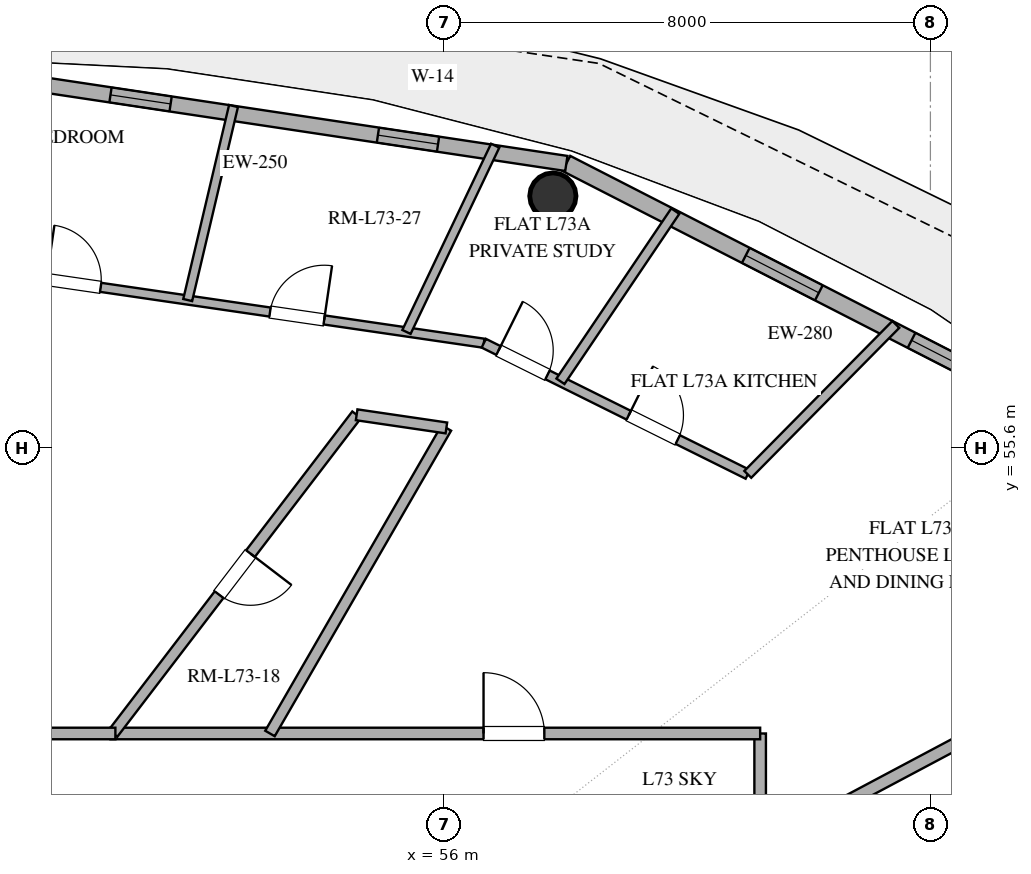
"""IFC4 building model, lengths in metres.
Left out: names, types, materials, properties, quantities, classifications, styles, units other than length and angle.
Written with IfcOpenShell. Run it as: python <this file> out.ifc"""

import sys

from ifc_helpers import new_model, si_unit, direction, frame, frame_2d, origin, origin_2d, place, context, subcontext, project, spatial, rectangle, hollow_circle, extrude, element, fill, save


model = new_model("IFC4")
c1 = context("Model", 3, precision=1e-05, world=origin(), true_north=direction((0.0, 1.0)))
c2 = subcontext(c1, "Body", "Model", "MODEL_VIEW")
j1 = project(units=[si_unit("LENGTHUNIT", "METRE"), si_unit("PLANEANGLEUNIT", "RADIAN")], contexts=[c1])
p1 = place(None, origin())
s1 = spatial("IfcSite", under=j1, at=p1, CompositionType="ELEMENT")
p2 = place(p1, origin())
s2 = spatial("IfcBuilding", under=s1, at=p2, CompositionType="ELEMENT")
p3 = place(p2, frame((0.0, 0.0, 283.8)))
s3 = spatial("IfcBuildingStorey", under=s2, at=p3, CompositionType="ELEMENT", Elevation=283.8)
p4 = place(p3, frame((57.791, 59.739, 0.0), z_axis=(0.0, 0.0, 1.0), x_axis=(1.0, 0.0, 0.0)))
e1 = element("IfcColumn", 1, at=p4, inside=s3, PredefinedType="COLUMN", context=c2, shape_type="SweptSolid", body=[
    extrude(hollow_circle(Radius=0.381, WallThickness=0.025, at=origin_2d()), origin(), (0.0, 0.0, 1.0), 3.37),
])
p5 = place(p3, frame((66.383, 55.987, 0.0), z_axis=(0.0, 0.0, 1.0), x_axis=(-0.890007394051, 0.455946091699, 0.0)))
e2 = element("IfcWall", 2, at=p5, inside=s3, PredefinedType="SOLIDWALL", context=c2, shape_type="SweptSolid", body=[
    extrude(rectangle(XDim=9.404, YDim=0.28, at=frame_2d((4.702, 0.0))), origin(), (0.0, 0.0, 1.0), 3.37),
])
p6 = place(p5, frame((1.675, 0.0, 0.85)))
e3 = element("IfcOpeningElement", 3, at=p6, cuts=e2, PredefinedType="OPENING", context=c2, shape_type="SweptSolid", body=[
    extrude(rectangle(XDim=1.35, YDim=1.8, at=frame_2d((0.675, 0.9))), frame((0.0, 0.15, 0.0), z_axis=(0.0, -1.0, 0.0), x_axis=(1.0, 0.0, 0.0)), (0.0, 0.0, 1.0), 0.3),
])
p7 = place(p5, frame((4.738, 0.0, 0.85)))
e4 = element("IfcOpeningElement", 4, at=p7, cuts=e2, PredefinedType="OPENING", context=c2, shape_type="SweptSolid", body=[
    extrude(rectangle(XDim=1.35, YDim=1.8, at=frame_2d((0.675, 0.9))), frame((0.0, 0.15, 0.0), z_axis=(0.0, -1.0, 0.0), x_axis=(1.0, 0.0, 0.0)), (0.0, 0.0, 1.0), 0.3),
])
p8 = place(p3, frame((58.013, 60.274, 0.0), z_axis=(0.0, 0.0, 1.0), x_axis=(-0.988882522213, 0.148698881169, 0.0)))
e5 = element("IfcWall", 5, at=p8, inside=s3, PredefinedType="SOLIDWALL", context=c2, shape_type="SweptSolid", body=[
    extrude(rectangle(XDim=10.125, YDim=0.25, at=frame_2d((5.062, 0.0))), origin(), (0.0, 0.0, 1.0), 3.37),
])
p9 = place(p8, frame((2.134, 0.0, 0.35)))
e6 = element("IfcOpeningElement", 6, at=p9, cuts=e5, PredefinedType="OPENING", context=c2, shape_type="SweptSolid", body=[
    extrude(rectangle(XDim=1.0, YDim=1.05, at=frame_2d((0.5, 0.525))), frame((0.0, 0.135, 0.0), z_axis=(0.0, -1.0, 0.0), x_axis=(1.0, 0.0, 0.0)), (0.0, 0.0, 1.0), 0.27),
])
p10 = place(p8, frame((6.582, 0.0, 1.42)))
e7 = element("IfcOpeningElement", 7, at=p10, cuts=e5, PredefinedType="OPENING", context=c2, shape_type="SweptSolid", body=[
    extrude(rectangle(XDim=1.0, YDim=1.05, at=frame_2d((0.5, 0.525))), frame((0.0, 0.135, 0.0), z_axis=(0.0, -1.0, 0.0), x_axis=(1.0, 0.0, 0.0)), (0.0, 0.0, 1.0), 0.27),
])
p11 = place(p3, frame((61.2, 50.9, 0.0), z_axis=(0.0, 0.0, 1.0), x_axis=(0.0, -1.0, 0.0)))
e8 = element("IfcWall", 8, at=p11, inside=s3, PredefinedType="PARTITIONING", context=c2, shape_type="SweptSolid", body=[
    extrude(rectangle(XDim=16.9, YDim=0.19, at=frame_2d((8.45, 0.0))), origin(), (0.0, 0.0, 1.0), 2.73),
])
p12 = place(p11, frame((8.873, 0.0, 0.0)))
e9 = element("IfcOpeningElement", 9, at=p12, cuts=e8, PredefinedType="OPENING", context=c2, shape_type="SweptSolid", body=[
    extrude(rectangle(XDim=1.0, YDim=2.2, at=frame_2d((0.5, 1.1))), frame((0.0, 0.105, 0.0), z_axis=(0.0, -1.0, 0.0), x_axis=(1.0, 0.0, 0.0)), (0.0, 0.0, 1.0), 0.21),
])
p13 = place(p3, frame((50.515, 50.9, 0.0), z_axis=(0.0, 0.0, 1.0), x_axis=(1.0, 0.0, 0.0)))
e10 = element("IfcWall", 10, at=p13, inside=s3, PredefinedType="PARTITIONING", context=c2, shape_type="SweptSolid", body=[
    extrude(rectangle(XDim=10.685, YDim=0.19, at=frame_2d((5.342, 0.0))), origin(), (0.0, 0.0, 1.0), 2.73),
])
p14 = place(p13, frame((6.135, 0.0, 0.0)))
e11 = element("IfcOpeningElement", 11, at=p14, cuts=e10, PredefinedType="OPENING", context=c2, shape_type="SweptSolid", body=[
    extrude(rectangle(XDim=1.0, YDim=2.2, at=frame_2d((0.5, 1.1))), frame((0.0, 0.105, 0.0), z_axis=(0.0, -1.0, 0.0), x_axis=(1.0, 0.0, 0.0)), (0.0, 0.0, 1.0), 0.21),
])
p15 = place(p3, frame((54.564, 56.141, 0.0), z_axis=(0.0, 0.0, 1.0), x_axis=(-0.607456974677, -0.794352581614, 0.0)))
e12 = element("IfcWall", 12, at=p15, inside=s3, PredefinedType="PLUMBINGWALL", context=c2, shape_type="SweptSolid", body=[
    extrude(rectangle(XDim=6.598, YDim=0.18, at=frame_2d((3.299, 0.0))), origin(), (0.0, 0.0, 1.0), 2.73),
])
p16 = place(p15, frame((2.874, 0.0, 0.0)))
e13 = element("IfcOpeningElement", 13, at=p16, cuts=e12, PredefinedType="OPENING", context=c2, shape_type="SweptSolid", body=[
    extrude(rectangle(XDim=0.85, YDim=2.1, at=frame_2d((0.425, 1.05))), frame((0.0, 0.1, 0.0), z_axis=(0.0, -1.0, 0.0), x_axis=(1.0, 0.0, 0.0)), (0.0, 0.0, 1.0), 0.2),
])
p17 = place(p3, frame((53.138, 50.9, 0.0), z_axis=(0.0, 0.0, 1.0), x_axis=(0.499985927882, 0.866033528173, 0.0)))
e14 = element("IfcWall", 14, at=p17, inside=s3, PredefinedType="PLUMBINGWALL", context=c2, shape_type="SweptSolid", body=[
    extrude(rectangle(XDim=5.802, YDim=0.18, at=frame_2d((2.901, 0.0))), origin(), (0.0, 0.0, 1.0), 2.73),
])
p18 = place(p3, frame((68.909, 53.118, 0.0), z_axis=(0.0, 0.0, 1.0), x_axis=(-0.882939716422, -0.469486375909, 0.0)))
e15 = element("IfcWall", 15, at=p18, inside=s3, PredefinedType="PARTITIONING", context=c2, shape_type="SweptSolid", body=[
    extrude(rectangle(XDim=8.732, YDim=0.2, at=frame_2d((4.366, 0.0))), origin(), (0.0, 0.0, 1.0), 2.73),
])
p19 = place(p3, frame((48.0, 58.58, 0.0), z_axis=(0.0, 0.0, 1.0), x_axis=(0.989536136377, -0.144285254977, 0.0)))
e16 = element("IfcWall", 16, at=p19, inside=s3, PredefinedType="PARTITIONING", context=c2, shape_type="SweptSolid", body=[
    extrude(rectangle(XDim=8.746, YDim=0.15, at=frame_2d((4.373, 0.0))), origin(), (0.0, 0.0, 1.0), 2.73),
])
p20 = place(p19, frame((1.479, 0.0, 0.0)))
e17 = element("IfcOpeningElement", 17, at=p20, cuts=e16, PredefinedType="OPENING", context=c2, shape_type="SweptSolid", body=[
    extrude(rectangle(XDim=0.9, YDim=2.1, at=frame_2d((0.45, 1.05))), frame((0.0, 0.085, 0.0), z_axis=(0.0, -1.0, 0.0), x_axis=(1.0, 0.0, 0.0)), (0.0, 0.0, 1.0), 0.17),
])
p21 = place(p19, frame((5.193, 0.0, 0.0)))
e18 = element("IfcOpeningElement", 18, at=p21, cuts=e16, PredefinedType="OPENING", context=c2, shape_type="SweptSolid", body=[
    extrude(rectangle(XDim=0.9, YDim=2.1, at=frame_2d((0.45, 1.05))), frame((0.0, 0.085, 0.0), z_axis=(0.0, -1.0, 0.0), x_axis=(1.0, 0.0, 0.0)), (0.0, 0.0, 1.0), 0.17),
])
p22 = place(p3, frame((56.655, 57.318, 0.0), z_axis=(0.0, 0.0, 1.0), x_axis=(0.895572412961, -0.44491578208, 0.0)))
e19 = element("IfcWall", 19, at=p22, inside=s3, PredefinedType="PLUMBINGWALL", context=c2, shape_type="SweptSolid", body=[
    extrude(rectangle(XDim=4.848, YDim=0.16, at=frame_2d((2.424, 0.0))), origin(), (0.0, 0.0, 1.0), 2.73),
])
p23 = place(p22, frame((2.662, 0.0, 0.0)))
e20 = element("IfcOpeningElement", 20, at=p23, cuts=e19, PredefinedType="OPENING", context=c2, shape_type="SweptSolid", body=[
    extrude(rectangle(XDim=0.9, YDim=2.1, at=frame_2d((0.45, 1.05))), frame((0.0, 0.09, 0.0), z_axis=(0.0, -1.0, 0.0), x_axis=(1.0, 0.0, 0.0)), (0.0, 0.0, 1.0), 0.18),
])
p24 = place(p22, frame((0.27, 0.0, 0.0)))
e21 = element("IfcOpeningElement", 21, at=p24, cuts=e19, PredefinedType="OPENING", context=c2, shape_type="SweptSolid", body=[
    extrude(rectangle(XDim=0.9, YDim=2.1, at=frame_2d((0.45, 1.05))), frame((0.0, 0.09, 0.0), z_axis=(0.0, -1.0, 0.0), x_axis=(1.0, 0.0, 0.0)), (0.0, 0.0, 1.0), 0.18),
])
p25 = place(p3, frame((60.997, 55.161, 0.0), z_axis=(0.0, 0.0, 1.0), x_axis=(0.702618919802, 0.711566338113, 0.0)))
e22 = element("IfcWall", 22, at=p25, inside=s3, PredefinedType="PLUMBINGWALL", context=c2, shape_type="SweptSolid", body=[
    extrude(rectangle(XDim=3.465, YDim=0.16, at=frame_2d((1.733, 0.0))), origin(), (0.0, 0.0, 1.0), 2.73),
])
p26 = place(p3, frame((56.842, 60.566, 0.0), z_axis=(0.0, 0.0, 1.0), x_axis=(-0.429975480416, -0.902840565239, 0.0)))
e23 = element("IfcWall", 23, at=p26, inside=s3, PredefinedType="PARTITIONING", context=c2, shape_type="SweptSolid", body=[
    extrude(rectangle(XDim=3.393, YDim=0.15, at=frame_2d((1.696, 0.0))), origin(), (0.0, 0.0, 1.0), 2.73),
])
p27 = place(p3, frame((59.804, 59.49, 0.0), z_axis=(0.0, 0.0, 1.0), x_axis=(-0.559397095435, -0.828899806743, 0.0)))
e24 = element("IfcWall", 24, at=p27, inside=s3, PredefinedType="PLUMBINGWALL", context=c2, shape_type="SweptSolid", body=[
    extrude(rectangle(XDim=3.376, YDim=0.16, at=frame_2d((1.688, 0.0))), origin(), (0.0, 0.0, 1.0), 2.73),
])
p28 = place(p3, frame((51.785, 58.028, 0.0), z_axis=(0.0, 0.0, 1.0), x_axis=(0.2298279545, 0.973231273301, 0.0)))
e25 = element("IfcWall", 25, at=p28, inside=s3, PredefinedType="PARTITIONING", context=c2, shape_type="SweptSolid", body=[
    extrude(rectangle(XDim=3.278, YDim=0.15, at=frame_2d((1.639, 0.0))), origin(), (0.0, 0.0, 1.0), 2.73),
])
p29 = place(p3, frame((47.657, 50.9, 0.0), z_axis=(0.0, 0.0, 1.0), x_axis=(1.0, 0.0, 0.0)))
e26 = element("IfcWall", 26, at=p29, inside=s3, PredefinedType="PARTITIONING", context=c2, shape_type="SweptSolid", body=[
    extrude(rectangle(XDim=2.939, YDim=0.19, at=frame_2d((1.469, 0.0))), origin(), (0.0, 0.0, 1.0), 2.73),
])
p30 = place(p3, frame((56.039, 55.925, 0.0), z_axis=(0.0, 0.0, 1.0), x_axis=(-0.989402061703, 0.14520179165, 0.0)))
e27 = element("IfcWall", 27, at=p30, inside=s3, PredefinedType="PLUMBINGWALL", context=c2, shape_type="SweptSolid", body=[
    extrude(rectangle(XDim=1.491, YDim=0.18, at=frame_2d((0.746, 0.0))), origin(), (0.0, 0.0, 1.0), 2.73),
])
p31 = place(p6, origin())
e28 = element("IfcWindow", 28, at=p31, inside=s3, PartitioningType="SINGLE_PANEL", PredefinedType="WINDOW", context=c2, shape_type="SweptSolid", body=[
    extrude(rectangle(XDim=1.35, YDim=1.8, at=frame_2d((0.675, 0.9))), frame((0.0, 0.03, 0.0), z_axis=(0.0, -1.0, 0.0), x_axis=(1.0, 0.0, 0.0)), (0.0, 0.0, 1.0), 0.06),
])
fill(e3, e28)
p32 = place(p7, origin())
e29 = element("IfcWindow", 29, at=p32, inside=s3, PartitioningType="SINGLE_PANEL", PredefinedType="WINDOW", context=c2, shape_type="SweptSolid", body=[
    extrude(rectangle(XDim=1.35, YDim=1.8, at=frame_2d((0.675, 0.9))), frame((0.0, 0.03, 0.0), z_axis=(0.0, -1.0, 0.0), x_axis=(1.0, 0.0, 0.0)), (0.0, 0.0, 1.0), 0.06),
])
fill(e4, e29)
p33 = place(p9, origin())
e30 = element("IfcWindow", 30, at=p33, inside=s3, PartitioningType="SINGLE_PANEL", PredefinedType="WINDOW", context=c2, shape_type="SweptSolid", body=[
    extrude(rectangle(XDim=1.0, YDim=1.05, at=frame_2d((0.5, 0.525))), frame((0.0, 0.03, 0.0), z_axis=(0.0, -1.0, 0.0), x_axis=(1.0, 0.0, 0.0)), (0.0, 0.0, 1.0), 0.06),
])
fill(e6, e30)
p34 = place(p10, origin())
e31 = element("IfcWindow", 31, at=p34, inside=s3, PartitioningType="SINGLE_PANEL", PredefinedType="WINDOW", context=c2, shape_type="SweptSolid", body=[
    extrude(rectangle(XDim=1.0, YDim=1.05, at=frame_2d((0.5, 0.525))), frame((0.0, 0.03, 0.0), z_axis=(0.0, -1.0, 0.0), x_axis=(1.0, 0.0, 0.0)), (0.0, 0.0, 1.0), 0.06),
])
fill(e7, e31)
p35 = place(p14, origin())
e32 = element("IfcDoor", 32, at=p35, inside=s3, OperationType="SINGLE_SWING_LEFT", PredefinedType="DOOR", context=c2, shape_type="SweptSolid", body=[
    extrude(rectangle(XDim=1.0, YDim=2.2, at=frame_2d((0.5, 1.1))), frame((0.0, 0.025, 0.0), z_axis=(0.0, -1.0, 0.0), x_axis=(1.0, 0.0, 0.0)), (0.0, 0.0, 1.0), 0.05),
])
fill(e11, e32)
p36 = place(p16, origin())
e33 = element("IfcDoor", 33, at=p36, inside=s3, OperationType="SINGLE_SWING_LEFT", PredefinedType="DOOR", context=c2, shape_type="SweptSolid", body=[
    extrude(rectangle(XDim=0.85, YDim=2.1, at=frame_2d((0.425, 1.05))), frame((0.0, 0.025, 0.0), z_axis=(0.0, -1.0, 0.0), x_axis=(1.0, 0.0, 0.0)), (0.0, 0.0, 1.0), 0.05),
])
fill(e13, e33)
p37 = place(p20, origin())
e34 = element("IfcDoor", 34, at=p37, inside=s3, OperationType="SINGLE_SWING_LEFT", PredefinedType="DOOR", context=c2, shape_type="SweptSolid", body=[
    extrude(rectangle(XDim=0.9, YDim=2.1, at=frame_2d((0.45, 1.05))), frame((0.0, 0.025, 0.0), z_axis=(0.0, -1.0, 0.0), x_axis=(1.0, 0.0, 0.0)), (0.0, 0.0, 1.0), 0.05),
])
fill(e17, e34)
p38 = place(p21, origin())
e35 = element("IfcDoor", 35, at=p38, inside=s3, OperationType="SINGLE_SWING_RIGHT", PredefinedType="DOOR", context=c2, shape_type="SweptSolid", body=[
    extrude(rectangle(XDim=0.9, YDim=2.1, at=frame_2d((0.45, 1.05))), frame((0.0, 0.025, 0.0), z_axis=(0.0, -1.0, 0.0), x_axis=(1.0, 0.0, 0.0)), (0.0, 0.0, 1.0), 0.05),
])
fill(e18, e35)
p39 = place(p23, origin())
e36 = element("IfcDoor", 36, at=p39, inside=s3, OperationType="SINGLE_SWING_LEFT", PredefinedType="DOOR", context=c2, shape_type="SweptSolid", body=[
    extrude(rectangle(XDim=0.9, YDim=2.1, at=frame_2d((0.45, 1.05))), frame((0.0, 0.025, 0.0), z_axis=(0.0, -1.0, 0.0), x_axis=(1.0, 0.0, 0.0)), (0.0, 0.0, 1.0), 0.05),
])
fill(e20, e36)
p40 = place(p24, origin())
e37 = element("IfcDoor", 37, at=p40, inside=s3, OperationType="SINGLE_SWING_LEFT", PredefinedType="DOOR", context=c2, shape_type="SweptSolid", body=[
    extrude(rectangle(XDim=0.9, YDim=2.1, at=frame_2d((0.45, 1.05))), frame((0.0, 0.025, 0.0), z_axis=(0.0, -1.0, 0.0), x_axis=(1.0, 0.0, 0.0)), (0.0, 0.0, 1.0), 0.05),
])
fill(e21, e37)
save(model, sys.argv[1])
